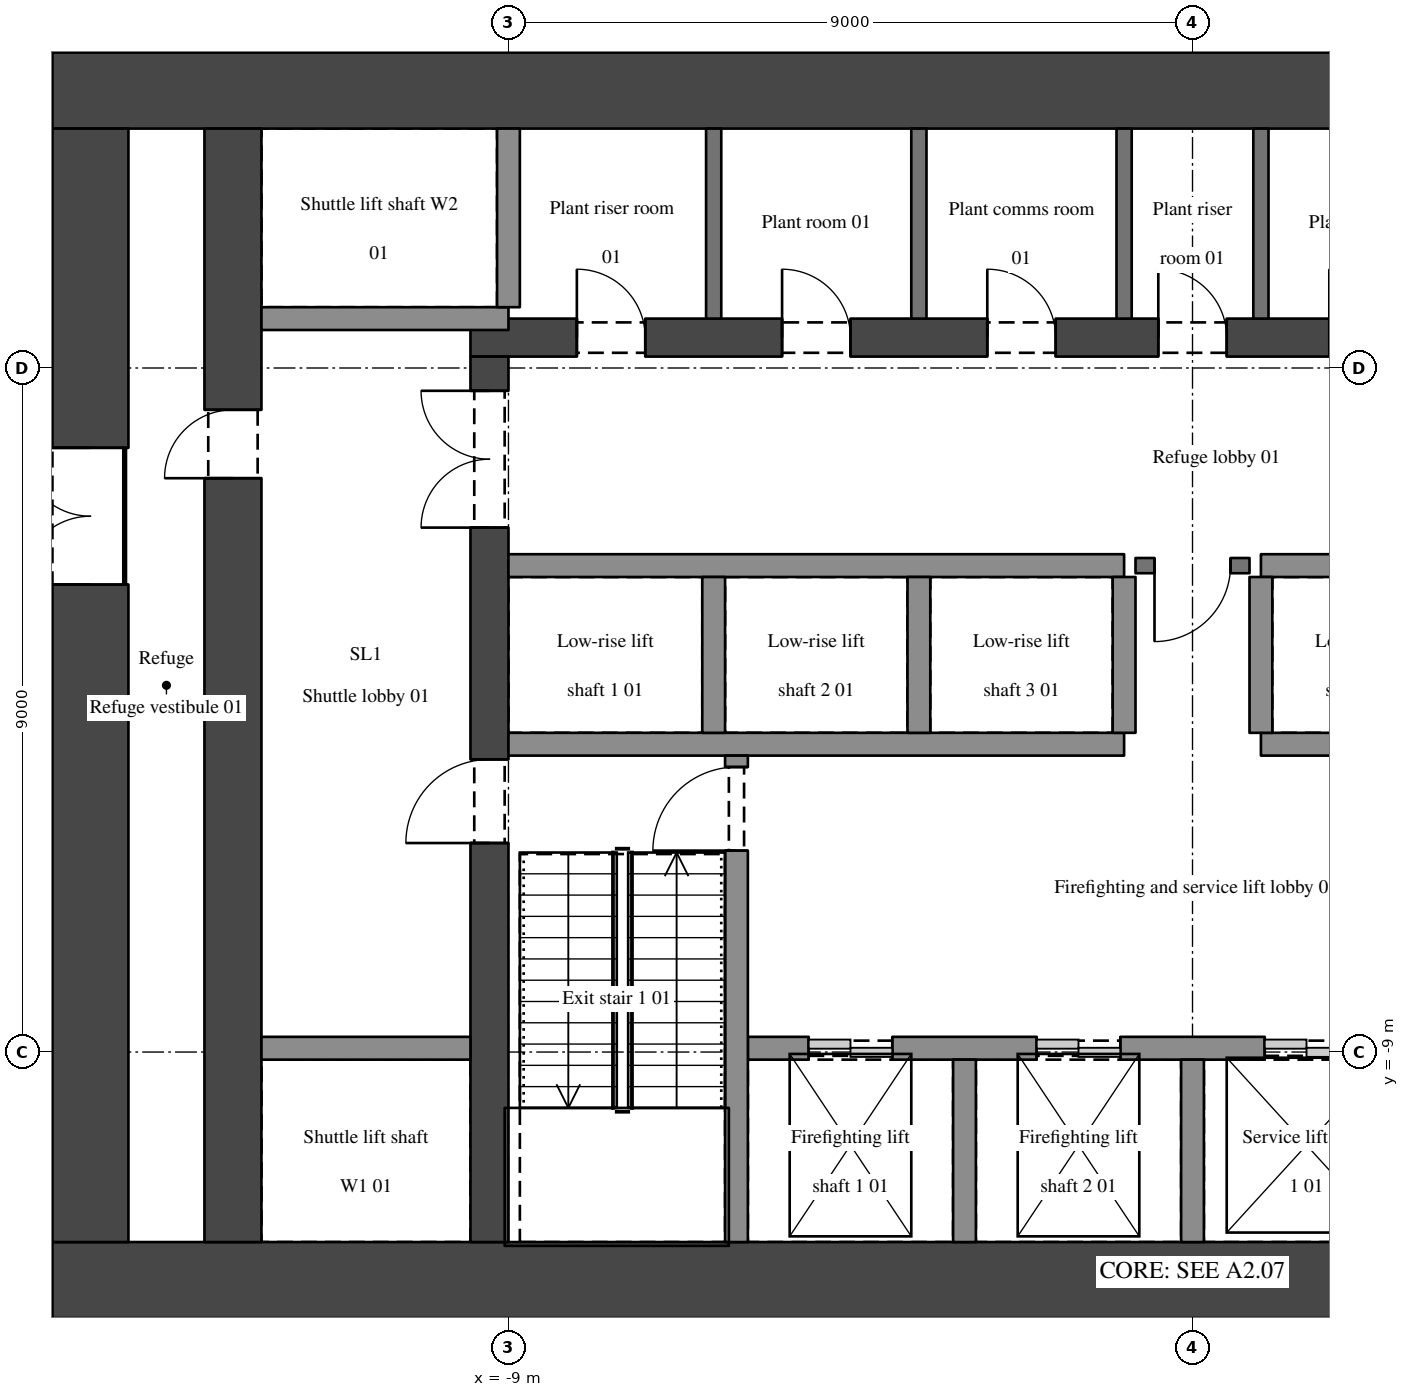
"""IFC4 building model, lengths in metres.
Left out: names, types, materials, properties, quantities, classifications, styles, units other than length and angle.
Written with IfcOpenShell. Run it as: python <this file> out.ifc"""

import sys

from ifc_helpers import new_model, si_unit, direction, frame, frame_2d, origin, place, context, subcontext, project, spatial, rectangle, extrude, element, fill, save


model = new_model("IFC4")
c1 = context("Model", 3, precision=1e-05, world=origin(), true_north=direction((0.0, 1.0)))
c2 = subcontext(c1, "Body", "Model", "MODEL_VIEW")
j1 = project(units=[si_unit("LENGTHUNIT", "METRE"), si_unit("PLANEANGLEUNIT", "RADIAN")], contexts=[c1])
p1 = place(None, origin())
s1 = spatial("IfcSite", under=j1, at=p1, CompositionType="ELEMENT")
p2 = place(p1, origin())
s2 = spatial("IfcBuilding", under=s1, at=p2, CompositionType="ELEMENT")
p3 = place(p2, frame((0.0, 0.0, 57.6)))
s3 = spatial("IfcBuildingStorey", under=s2, at=p3, CompositionType="ELEMENT", Elevation=57.6)
for number, where, z_axis, x_axis in (
    (1, (-15.0, -12.0, 0.0), (0.0, 0.0, 1.0), (1.0, 0.0, 0.0)),
    (2, (-15.0, 3.65, 0.0), (0.0, 0.0, 1.0), (1.0, 0.0, 0.0)),
):
    element("IfcWall", number, at=place(p3, frame(where, z_axis=z_axis, x_axis=x_axis)), inside=s3, PredefinedType="SHEAR", context=c2, shape_type="SweptSolid", body=[
        extrude(rectangle(XDim=30.0, YDim=1.0, at=frame_2d((15.0, 0.0))), origin(), (0.0, 0.0, 1.0), 4.5),
    ])
p4 = place(p3, frame((-14.5, -11.5, 0.0), z_axis=(0.0, 0.0, 1.0), x_axis=(0.0, 1.0, 0.0)))
e3 = element("IfcWall", 3, at=p4, inside=s3, PredefinedType="SHEAR", context=c2, shape_type="SweptSolid", body=[
    extrude(rectangle(XDim=14.65, YDim=1.0, at=frame_2d((7.325, 0.0))), origin(), (0.0, 0.0, 1.0), 4.5),
])
p5 = place(p4, frame((8.65, 0.0, 0.0)))
e4 = element("IfcOpeningElement", 4, at=p5, cuts=e3, PredefinedType="OPENING", context=c2, shape_type="SweptSolid", body=[
    extrude(rectangle(XDim=1.8, YDim=2.1, at=frame_2d((0.9, 1.05))), frame((0.0, 0.51, 0.0), z_axis=(0.0, -1.0, 0.0), x_axis=(1.0, 0.0, 0.0)), (0.0, 0.0, 1.0), 1.02),
])
p6 = place(p3, frame((-12.625, -11.5, 0.0), z_axis=(0.0, 0.0, 1.0), x_axis=(0.0, 1.0, 0.0)))
e5 = element("IfcWall", 5, at=p6, inside=s3, PredefinedType="SHEAR", context=c2, shape_type="SweptSolid", body=[
    extrude(rectangle(XDim=14.65, YDim=0.75, at=frame_2d((7.325, 0.0))), origin(), (0.0, 0.0, 1.0), 4.5),
])
p7 = place(p6, frame((10.05, 0.0, 0.0)))
e6 = element("IfcOpeningElement", 6, at=p7, cuts=e5, PredefinedType="OPENING", context=c2, shape_type="SweptSolid", body=[
    extrude(rectangle(XDim=0.9, YDim=2.1, at=frame_2d((0.45, 1.05))), frame((0.0, 0.385, 0.0), z_axis=(0.0, -1.0, 0.0), x_axis=(1.0, 0.0, 0.0)), (0.0, 0.0, 1.0), 0.77),
])
p8 = place(p3, frame((-9.5, 0.4, 0.0), z_axis=(0.0, 0.0, 1.0), x_axis=(1.0, 0.0, 0.0)))
e7 = element("IfcWall", 7, at=p8, inside=s3, PredefinedType="SHEAR", context=c2, shape_type="SweptSolid", body=[
    extrude(rectangle(XDim=19.0, YDim=0.5, at=frame_2d((9.5, 0.0))), origin(), (0.0, 0.0, 1.0), 4.5),
])
p9 = place(p8, frame((1.4, 0.0, 0.0)))
e8 = element("IfcOpeningElement", 8, at=p9, cuts=e7, PredefinedType="OPENING", context=c2, shape_type="SweptSolid", body=[
    extrude(rectangle(XDim=0.9, YDim=2.1, at=frame_2d((0.45, 1.05))), frame((0.0, 0.26, 0.0), z_axis=(0.0, -1.0, 0.0), x_axis=(1.0, 0.0, 0.0)), (0.0, 0.0, 1.0), 0.52),
])
p10 = place(p8, frame((4.1, 0.0, 0.0)))
e9 = element("IfcOpeningElement", 9, at=p10, cuts=e7, PredefinedType="OPENING", context=c2, shape_type="SweptSolid", body=[
    extrude(rectangle(XDim=0.9, YDim=2.1, at=frame_2d((0.45, 1.05))), frame((0.0, 0.26, 0.0), z_axis=(0.0, -1.0, 0.0), x_axis=(1.0, 0.0, 0.0)), (0.0, 0.0, 1.0), 0.52),
])
p11 = place(p8, frame((6.8, 0.0, 0.0)))
e10 = element("IfcOpeningElement", 10, at=p11, cuts=e7, PredefinedType="OPENING", context=c2, shape_type="SweptSolid", body=[
    extrude(rectangle(XDim=0.9, YDim=2.1, at=frame_2d((0.45, 1.05))), frame((0.0, 0.26, 0.0), z_axis=(0.0, -1.0, 0.0), x_axis=(1.0, 0.0, 0.0)), (0.0, 0.0, 1.0), 0.52),
])
p12 = place(p8, frame((11.3, 0.0, 0.0)))
e11 = element("IfcOpeningElement", 11, at=p12, cuts=e7, PredefinedType="OPENING", context=c2, shape_type="SweptSolid", body=[
    extrude(rectangle(XDim=0.9, YDim=2.1, at=frame_2d((0.45, 1.05))), frame((0.0, 0.26, 0.0), z_axis=(0.0, -1.0, 0.0), x_axis=(1.0, 0.0, 0.0)), (0.0, 0.0, 1.0), 0.52),
])
p13 = place(p8, frame((14.0, 0.0, 0.0)))
e12 = element("IfcOpeningElement", 12, at=p13, cuts=e7, PredefinedType="OPENING", context=c2, shape_type="SweptSolid", body=[
    extrude(rectangle(XDim=0.9, YDim=2.1, at=frame_2d((0.45, 1.05))), frame((0.0, 0.26, 0.0), z_axis=(0.0, -1.0, 0.0), x_axis=(1.0, 0.0, 0.0)), (0.0, 0.0, 1.0), 0.52),
])
p14 = place(p8, frame((16.7, 0.0, 0.0)))
e13 = element("IfcOpeningElement", 13, at=p14, cuts=e7, PredefinedType="OPENING", context=c2, shape_type="SweptSolid", body=[
    extrude(rectangle(XDim=0.9, YDim=2.1, at=frame_2d((0.45, 1.05))), frame((0.0, 0.26, 0.0), z_axis=(0.0, -1.0, 0.0), x_axis=(1.0, 0.0, 0.0)), (0.0, 0.0, 1.0), 0.52),
])
p15 = place(p8, frame((9.05, 0.0, 0.0)))
e14 = element("IfcOpeningElement", 14, at=p15, cuts=e7, PredefinedType="OPENING", context=c2, shape_type="SweptSolid", body=[
    extrude(rectangle(XDim=0.9, YDim=2.1, at=frame_2d((0.45, 1.05))), frame((0.0, 0.26, 0.0), z_axis=(0.0, -1.0, 0.0), x_axis=(1.0, 0.0, 0.0)), (0.0, 0.0, 1.0), 0.52),
])
p16 = place(p3, frame((-9.25, -11.5, 0.0), z_axis=(0.0, 0.0, 1.0), x_axis=(0.0, 1.0, 0.0)))
e15 = element("IfcWall", 15, at=p16, inside=s3, PredefinedType="SHEAR", context=c2, shape_type="SweptSolid", body=[
    extrude(rectangle(XDim=11.65, YDim=0.5, at=frame_2d((5.825, 0.0))), origin(), (0.0, 0.0, 1.0), 4.5),
])
p17 = place(p16, frame((9.4, 0.0, 0.0)))
e16 = element("IfcOpeningElement", 16, at=p17, cuts=e15, PredefinedType="OPENING", context=c2, shape_type="SweptSolid", body=[
    extrude(rectangle(XDim=1.8, YDim=2.1, at=frame_2d((0.9, 1.05))), frame((0.0, 0.26, 0.0), z_axis=(0.0, -1.0, 0.0), x_axis=(1.0, 0.0, 0.0)), (0.0, 0.0, 1.0), 0.52),
])
p18 = place(p16, frame((5.25, 0.0, 0.0)))
e17 = element("IfcOpeningElement", 17, at=p18, cuts=e15, PredefinedType="OPENING", context=c2, shape_type="SweptSolid", body=[
    extrude(rectangle(XDim=1.1, YDim=2.1, at=frame_2d((0.55, 1.05))), frame((0.0, 0.26, 0.0), z_axis=(0.0, -1.0, 0.0), x_axis=(1.0, 0.0, 0.0)), (0.0, 0.0, 1.0), 0.52),
])
p19 = place(p3, frame((-12.25, -8.95, 0.0), z_axis=(0.0, 0.0, 1.0), x_axis=(1.0, 0.0, 0.0)))
e18 = element("IfcWall", 18, at=p19, inside=s3, PredefinedType="SHEAR", context=c2, shape_type="SweptSolid", body=[
    extrude(rectangle(XDim=2.75, YDim=0.3, at=frame_2d((1.375, 0.0))), origin(), (0.0, 0.0, 1.0), 4.5),
])
p20 = place(p3, frame((-5.85, -8.95, 0.0), z_axis=(0.0, 0.0, 1.0), x_axis=(1.0, 0.0, 0.0)))
e19 = element("IfcWall", 19, at=p20, inside=s3, PredefinedType="SHEAR", context=c2, shape_type="SweptSolid", body=[
    extrude(rectangle(XDim=11.7, YDim=0.3, at=frame_2d((5.85, 0.0))), origin(), (0.0, 0.0, 1.0), 4.5),
])
p21 = place(p20, frame((0.8, 0.0, 0.0)))
e20 = element("IfcOpeningElement", 20, at=p21, cuts=e19, PredefinedType="OPENING", context=c2, shape_type="SweptSolid", body=[
    extrude(rectangle(XDim=1.1, YDim=2.1, at=frame_2d((0.55, 1.05))), frame((0.0, 0.16, 0.0), z_axis=(0.0, -1.0, 0.0), x_axis=(1.0, 0.0, 0.0)), (0.0, 0.0, 1.0), 0.32),
])
p22 = place(p20, frame((3.8, 0.0, 0.0)))
e21 = element("IfcOpeningElement", 21, at=p22, cuts=e19, PredefinedType="OPENING", context=c2, shape_type="SweptSolid", body=[
    extrude(rectangle(XDim=1.1, YDim=2.1, at=frame_2d((0.55, 1.05))), frame((0.0, 0.16, 0.0), z_axis=(0.0, -1.0, 0.0), x_axis=(1.0, 0.0, 0.0)), (0.0, 0.0, 1.0), 0.32),
])
p23 = place(p20, frame((6.8, 0.0, 0.0)))
e22 = element("IfcOpeningElement", 22, at=p23, cuts=e19, PredefinedType="OPENING", context=c2, shape_type="SweptSolid", body=[
    extrude(rectangle(XDim=1.1, YDim=2.1, at=frame_2d((0.55, 1.05))), frame((0.0, 0.16, 0.0), z_axis=(0.0, -1.0, 0.0), x_axis=(1.0, 0.0, 0.0)), (0.0, 0.0, 1.0), 0.32),
])
p24 = place(p20, frame((9.8, 0.0, 0.0)))
e23 = element("IfcOpeningElement", 23, at=p24, cuts=e19, PredefinedType="OPENING", context=c2, shape_type="SweptSolid", body=[
    extrude(rectangle(XDim=1.1, YDim=2.1, at=frame_2d((0.55, 1.05))), frame((0.0, 0.16, 0.0), z_axis=(0.0, -1.0, 0.0), x_axis=(1.0, 0.0, 0.0)), (0.0, 0.0, 1.0), 0.32),
])
for number, where, z_axis, x_axis in (
    (24, (-9.0, -4.95, 0.0), (0.0, 0.0, 1.0), (1.0, 0.0, 0.0)),
    (25, (0.9, -4.95, 0.0), (0.0, 0.0, 1.0), (1.0, 0.0, 0.0)),
    (26, (-9.0, -2.6, 0.0), (0.0, 0.0, 1.0), (1.0, 0.0, 0.0)),
):
    element("IfcWall", number, at=place(p3, frame(where, z_axis=z_axis, x_axis=x_axis)), inside=s3, PredefinedType="SHEAR", context=c2, shape_type="SweptSolid", body=[
        extrude(rectangle(XDim=8.1, YDim=0.3, at=frame_2d((4.05, 0.0))), origin(), (0.0, 0.0, 1.0), 4.5),
    ])
p25 = place(p3, frame((0.75, -2.6, 0.0), z_axis=(0.0, 0.0, 1.0), x_axis=(-1.0, 0.0, 0.0)))
e27 = element("IfcWall", 27, at=p25, inside=s3, PredefinedType="SOLIDWALL", context=c2, shape_type="SweptSolid", body=[
    extrude(rectangle(XDim=1.5, YDim=0.2, at=frame_2d((0.75, 0.0))), origin(), (0.0, 0.0, 1.0), 4.2),
])
p26 = place(p25, frame((0.25, 0.0, 0.0)))
e28 = element("IfcOpeningElement", 28, at=p26, cuts=e27, PredefinedType="OPENING", context=c2, shape_type="SweptSolid", body=[
    extrude(rectangle(XDim=1.0, YDim=2.1, at=frame_2d((0.5, 1.05))), frame((0.0, 0.11, 0.0), z_axis=(0.0, -1.0, 0.0), x_axis=(1.0, 0.0, 0.0)), (0.0, 0.0, 1.0), 0.22),
])
p27 = place(p3, frame((0.9, -2.6, 0.0), z_axis=(0.0, 0.0, 1.0), x_axis=(1.0, 0.0, 0.0)))
e29 = element("IfcWall", 29, at=p27, inside=s3, PredefinedType="SHEAR", context=c2, shape_type="SweptSolid", body=[
    extrude(rectangle(XDim=8.1, YDim=0.3, at=frame_2d((4.05, 0.0))), origin(), (0.0, 0.0, 1.0), 4.5),
])
p28 = place(p3, frame((-9.0, 0.65, 0.0), z_axis=(0.0, 0.0, 1.0), x_axis=(-1.0, 0.0, 0.0)))
e30 = element("IfcWall", 30, at=p28, inside=s3, PredefinedType="SHEAR", context=c2, shape_type="SweptSolid", body=[
    extrude(rectangle(XDim=3.25, YDim=0.3, at=frame_2d((1.625, 0.0))), origin(), (0.0, 0.0, 1.0), 4.5),
])
p29 = place(p3, frame((-9.0, 0.8, 0.0), z_axis=(0.0, 0.0, 1.0), x_axis=(0.0, 1.0, 0.0)))
e31 = element("IfcWall", 31, at=p29, inside=s3, PredefinedType="SHEAR", context=c2, shape_type="SweptSolid", body=[
    extrude(rectangle(XDim=2.35, YDim=0.3, at=frame_2d((1.175, 0.0))), origin(), (0.0, 0.0, 1.0), 4.5),
])
p30 = place(p3, frame((-6.3, -4.8, 0.0), z_axis=(0.0, 0.0, 1.0), x_axis=(0.0, 1.0, 0.0)))
e32 = element("IfcWall", 32, at=p30, inside=s3, PredefinedType="SHEAR", context=c2, shape_type="SweptSolid", body=[
    extrude(rectangle(XDim=2.05, YDim=0.3, at=frame_2d((1.025, 0.0))), origin(), (0.0, 0.0, 1.0), 4.5),
])
p31 = place(p3, frame((-6.3, 0.65, 0.0), z_axis=(0.0, 0.0, 1.0), x_axis=(0.0, 1.0, 0.0)))
e33 = element("IfcWall", 33, at=p31, inside=s3, PredefinedType="SOLIDWALL", context=c2, shape_type="SweptSolid", body=[
    extrude(rectangle(XDim=2.5, YDim=0.2, at=frame_2d((1.25, 0.0))), origin(), (0.0, 0.0, 1.0), 4.2),
])
p32 = place(p3, frame((-6.0, -11.5, 0.0), z_axis=(0.0, 0.0, 1.0), x_axis=(0.0, 1.0, 0.0)))
e34 = element("IfcWall", 34, at=p32, inside=s3, PredefinedType="SHEAR", context=c2, shape_type="SweptSolid", body=[
    extrude(rectangle(XDim=6.4, YDim=0.3, at=frame_2d((3.2, 0.0))), origin(), (0.0, 0.0, 1.0), 4.5),
])
p33 = place(p32, frame((5.15, 0.0, 0.0)))
e35 = element("IfcOpeningElement", 35, at=p33, cuts=e34, PredefinedType="OPENING", context=c2, shape_type="SweptSolid", body=[
    extrude(rectangle(XDim=1.1, YDim=2.1, at=frame_2d((0.55, 1.05))), frame((0.0, 0.16, 0.0), z_axis=(0.0, -1.0, 0.0), x_axis=(1.0, 0.0, 0.0)), (0.0, 0.0, 1.0), 0.32),
])
p34 = place(p3, frame((-3.6, -4.8, 0.0), z_axis=(0.0, 0.0, 1.0), x_axis=(0.0, 1.0, 0.0)))
e36 = element("IfcWall", 36, at=p34, inside=s3, PredefinedType="SHEAR", context=c2, shape_type="SweptSolid", body=[
    extrude(rectangle(XDim=2.05, YDim=0.3, at=frame_2d((1.025, 0.0))), origin(), (0.0, 0.0, 1.0), 4.5),
])
p35 = place(p3, frame((-3.6, 0.65, 0.0), z_axis=(0.0, 0.0, 1.0), x_axis=(0.0, 1.0, 0.0)))
e37 = element("IfcWall", 37, at=p35, inside=s3, PredefinedType="SOLIDWALL", context=c2, shape_type="SweptSolid", body=[
    extrude(rectangle(XDim=2.5, YDim=0.2, at=frame_2d((1.25, 0.0))), origin(), (0.0, 0.0, 1.0), 4.2),
])
p36 = place(p3, frame((-3.0, -11.5, 0.0), z_axis=(0.0, 0.0, 1.0), x_axis=(0.0, 1.0, 0.0)))
e38 = element("IfcWall", 38, at=p36, inside=s3, PredefinedType="SHEAR", context=c2, shape_type="SweptSolid", body=[
    extrude(rectangle(XDim=2.4, YDim=0.3, at=frame_2d((1.2, 0.0))), origin(), (0.0, 0.0, 1.0), 4.5),
])
p37 = place(p3, frame((-0.9, -4.8, 0.0), z_axis=(0.0, 0.0, 1.0), x_axis=(0.0, 1.0, 0.0)))
e39 = element("IfcWall", 39, at=p37, inside=s3, PredefinedType="SHEAR", context=c2, shape_type="SweptSolid", body=[
    extrude(rectangle(XDim=2.05, YDim=0.3, at=frame_2d((1.025, 0.0))), origin(), (0.0, 0.0, 1.0), 4.5),
])
p38 = place(p3, frame((-0.9, 0.65, 0.0), z_axis=(0.0, 0.0, 1.0), x_axis=(0.0, 1.0, 0.0)))
e40 = element("IfcWall", 40, at=p38, inside=s3, PredefinedType="SOLIDWALL", context=c2, shape_type="SweptSolid", body=[
    extrude(rectangle(XDim=2.5, YDim=0.2, at=frame_2d((1.25, 0.0))), origin(), (0.0, 0.0, 1.0), 4.2),
])
p39 = place(p3, frame((0.0, -11.5, 0.0), z_axis=(0.0, 0.0, 1.0), x_axis=(0.0, 1.0, 0.0)))
e41 = element("IfcWall", 41, at=p39, inside=s3, PredefinedType="SHEAR", context=c2, shape_type="SweptSolid", body=[
    extrude(rectangle(XDim=2.4, YDim=0.3, at=frame_2d((1.2, 0.0))), origin(), (0.0, 0.0, 1.0), 4.5),
])
p40 = place(p3, frame((0.9, -4.8, 0.0), z_axis=(0.0, 0.0, 1.0), x_axis=(0.0, 1.0, 0.0)))
e42 = element("IfcWall", 42, at=p40, inside=s3, PredefinedType="SHEAR", context=c2, shape_type="SweptSolid", body=[
    extrude(rectangle(XDim=2.05, YDim=0.3, at=frame_2d((1.025, 0.0))), origin(), (0.0, 0.0, 1.0), 4.5),
])
p41 = place(p3, frame((0.9, 0.65, 0.0), z_axis=(0.0, 0.0, 1.0), x_axis=(0.0, 1.0, 0.0)))
e43 = element("IfcWall", 43, at=p41, inside=s3, PredefinedType="SOLIDWALL", context=c2, shape_type="SweptSolid", body=[
    extrude(rectangle(XDim=2.5, YDim=0.2, at=frame_2d((1.25, 0.0))), origin(), (0.0, 0.0, 1.0), 4.2),
])
p42 = place(p17, origin())
e44 = element("IfcDoor", 44, at=p42, inside=s3, OperationType="DOUBLE_DOOR_SINGLE_SWING", PredefinedType="DOOR", context=c2, shape_type="SweptSolid", body=[
    extrude(rectangle(XDim=1.8, YDim=2.1, at=frame_2d((0.9, 1.05))), frame((0.0, 0.025, 0.0), z_axis=(0.0, -1.0, 0.0), x_axis=(1.0, 0.0, 0.0)), (0.0, 0.0, 1.0), 0.05),
])
fill(e16, e44)
p43 = place(p26, origin())
e45 = element("IfcDoor", 45, at=p43, inside=s3, OperationType="SINGLE_SWING_RIGHT", PredefinedType="DOOR", context=c2, shape_type="SweptSolid", body=[
    extrude(rectangle(XDim=1.0, YDim=2.1, at=frame_2d((0.5, 1.05))), frame((0.0, 0.025, 0.0), z_axis=(0.0, -1.0, 0.0), x_axis=(1.0, 0.0, 0.0)), (0.0, 0.0, 1.0), 0.05),
])
fill(e28, e45)
p44 = place(p33, origin())
e46 = element("IfcDoor", 46, at=p44, inside=s3, OperationType="SINGLE_SWING_LEFT", PredefinedType="DOOR", context=c2, shape_type="SweptSolid", body=[
    extrude(rectangle(XDim=1.1, YDim=2.1, at=frame_2d((0.55, 1.05))), frame((0.0, 0.025, 0.0), z_axis=(0.0, -1.0, 0.0), x_axis=(1.0, 0.0, 0.0)), (0.0, 0.0, 1.0), 0.05),
])
fill(e35, e46)
p45 = place(p18, origin())
e47 = element("IfcDoor", 47, at=p45, inside=s3, OperationType="SINGLE_SWING_LEFT", PredefinedType="DOOR", context=c2, shape_type="SweptSolid", body=[
    extrude(rectangle(XDim=1.1, YDim=2.1, at=frame_2d((0.55, 1.05))), frame((0.0, 0.025, 0.0), z_axis=(0.0, -1.0, 0.0), x_axis=(1.0, 0.0, 0.0)), (0.0, 0.0, 1.0), 0.05),
])
fill(e17, e47)
p46 = place(p9, origin())
e48 = element("IfcDoor", 48, at=p46, inside=s3, OperationType="SINGLE_SWING_LEFT", PredefinedType="DOOR", context=c2, shape_type="SweptSolid", body=[
    extrude(rectangle(XDim=0.9, YDim=2.1, at=frame_2d((0.45, 1.05))), frame((0.0, 0.025, 0.0), z_axis=(0.0, -1.0, 0.0), x_axis=(1.0, 0.0, 0.0)), (0.0, 0.0, 1.0), 0.05),
])
fill(e8, e48)
p47 = place(p10, origin())
e49 = element("IfcDoor", 49, at=p47, inside=s3, OperationType="SINGLE_SWING_LEFT", PredefinedType="DOOR", context=c2, shape_type="SweptSolid", body=[
    extrude(rectangle(XDim=0.9, YDim=2.1, at=frame_2d((0.45, 1.05))), frame((0.0, 0.025, 0.0), z_axis=(0.0, -1.0, 0.0), x_axis=(1.0, 0.0, 0.0)), (0.0, 0.0, 1.0), 0.05),
])
fill(e9, e49)
p48 = place(p11, origin())
e50 = element("IfcDoor", 50, at=p48, inside=s3, OperationType="SINGLE_SWING_LEFT", PredefinedType="DOOR", context=c2, shape_type="SweptSolid", body=[
    extrude(rectangle(XDim=0.9, YDim=2.1, at=frame_2d((0.45, 1.05))), frame((0.0, 0.025, 0.0), z_axis=(0.0, -1.0, 0.0), x_axis=(1.0, 0.0, 0.0)), (0.0, 0.0, 1.0), 0.05),
])
fill(e10, e50)
p49 = place(p15, origin())
e51 = element("IfcDoor", 51, at=p49, inside=s3, OperationType="SINGLE_SWING_LEFT", PredefinedType="DOOR", context=c2, shape_type="SweptSolid", body=[
    extrude(rectangle(XDim=0.9, YDim=2.1, at=frame_2d((0.45, 1.05))), frame((0.0, 0.025, 0.0), z_axis=(0.0, -1.0, 0.0), x_axis=(1.0, 0.0, 0.0)), (0.0, 0.0, 1.0), 0.05),
])
fill(e14, e51)
p50 = place(p7, origin())
e52 = element("IfcDoor", 52, at=p50, inside=s3, OperationType="SINGLE_SWING_LEFT", PredefinedType="DOOR", context=c2, shape_type="SweptSolid", body=[
    extrude(rectangle(XDim=0.9, YDim=2.1, at=frame_2d((0.45, 1.05))), frame((0.0, 0.025, 0.0), z_axis=(0.0, -1.0, 0.0), x_axis=(1.0, 0.0, 0.0)), (0.0, 0.0, 1.0), 0.05),
])
fill(e6, e52)
p51 = place(p21, origin())
e53 = element("IfcDoor", 53, at=p51, inside=s3, OperationType="DOUBLE_DOOR_SLIDING", PredefinedType="DOOR", context=c2, shape_type="SweptSolid", body=[
    extrude(rectangle(XDim=1.1, YDim=2.1, at=frame_2d((0.55, 1.05))), frame((0.0, 0.025, 0.0), z_axis=(0.0, -1.0, 0.0), x_axis=(1.0, 0.0, 0.0)), (0.0, 0.0, 1.0), 0.05),
])
fill(e20, e53)
p52 = place(p22, origin())
e54 = element("IfcDoor", 54, at=p52, inside=s3, OperationType="DOUBLE_DOOR_SLIDING", PredefinedType="DOOR", context=c2, shape_type="SweptSolid", body=[
    extrude(rectangle(XDim=1.1, YDim=2.1, at=frame_2d((0.55, 1.05))), frame((0.0, 0.025, 0.0), z_axis=(0.0, -1.0, 0.0), x_axis=(1.0, 0.0, 0.0)), (0.0, 0.0, 1.0), 0.05),
])
fill(e21, e54)
p53 = place(p23, origin())
e55 = element("IfcDoor", 55, at=p53, inside=s3, OperationType="DOUBLE_DOOR_SLIDING", PredefinedType="DOOR", context=c2, shape_type="SweptSolid", body=[
    extrude(rectangle(XDim=1.1, YDim=2.1, at=frame_2d((0.55, 1.05))), frame((0.0, 0.025, 0.0), z_axis=(0.0, -1.0, 0.0), x_axis=(1.0, 0.0, 0.0)), (0.0, 0.0, 1.0), 0.05),
])
fill(e22, e55)
p54 = place(p5, origin())
e56 = element("IfcDoor", 56, at=p54, inside=s3, OperationType="DOUBLE_DOOR_SINGLE_SWING", PredefinedType="DOOR", context=c2, shape_type="SweptSolid", body=[
    extrude(rectangle(XDim=1.8, YDim=2.1, at=frame_2d((0.9, 1.05))), frame((0.0, 0.025, 0.0), z_axis=(0.0, -1.0, 0.0), x_axis=(1.0, 0.0, 0.0)), (0.0, 0.0, 1.0), 0.05),
])
fill(e4, e56)
save(model, sys.argv[1])
